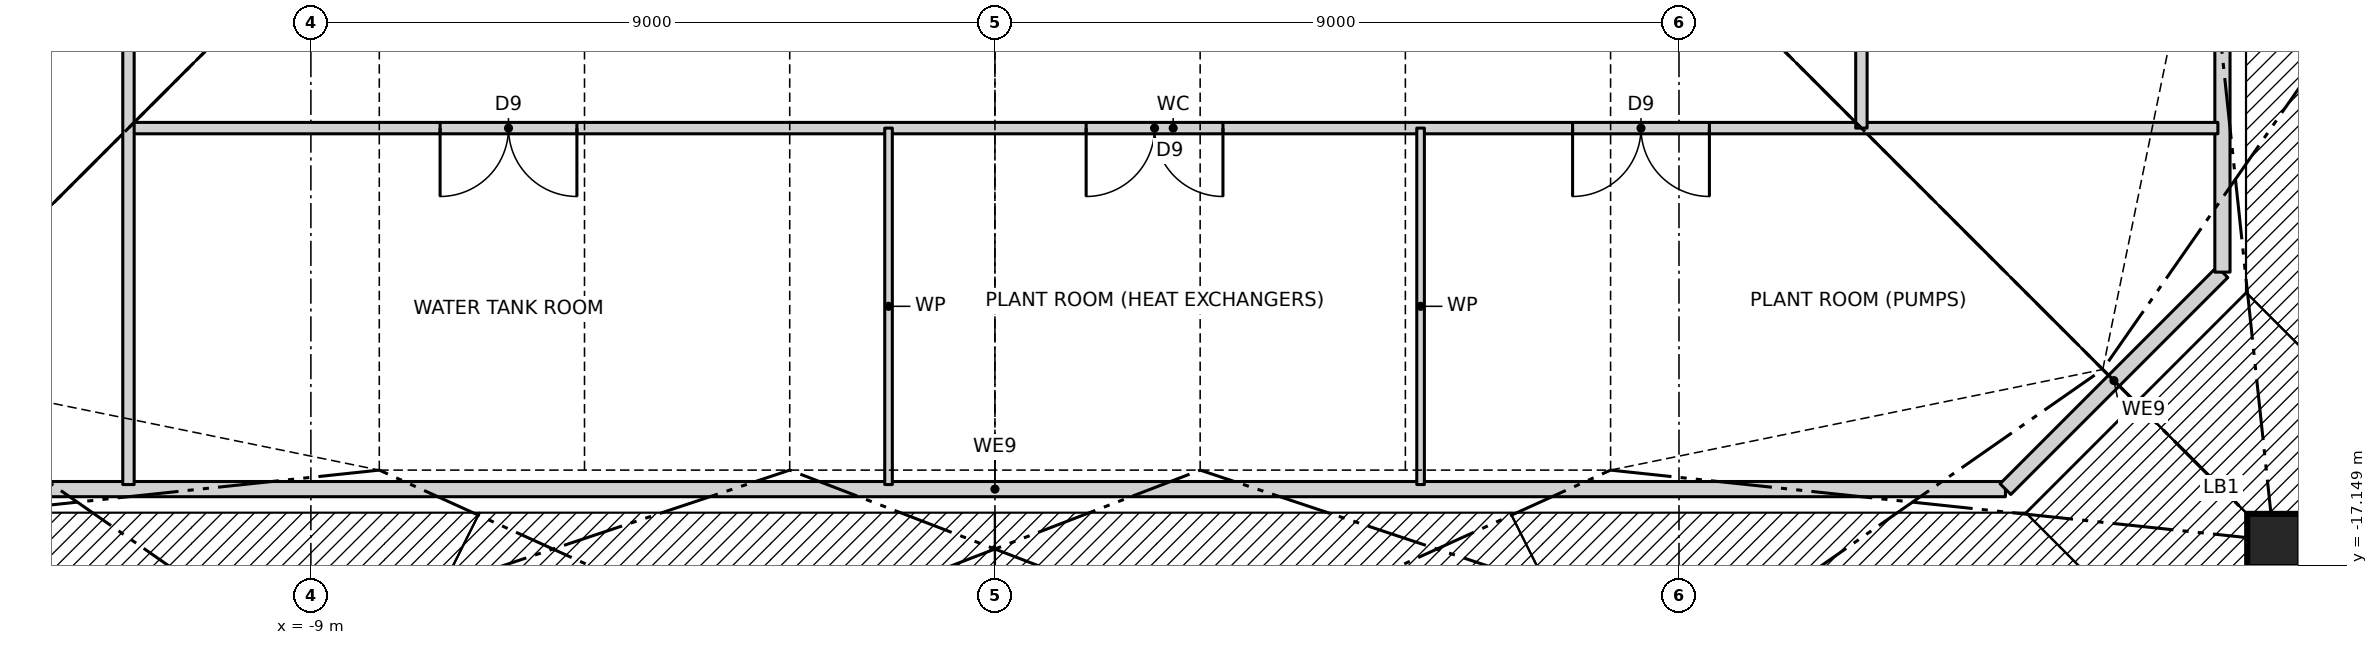
"""IFC4 building model, lengths in metres.
Left out: names, types, materials, properties, quantities, classifications, styles, units other than length and angle.
Written with IfcOpenShell. Run it as: python <this file> out.ifc"""

import sys

from ifc_helpers import new_model, si_unit, direction, frame, frame_2d, origin, origin_2d, place, context, subcontext, project, spatial, rectangle, hollow_rectangle, extrude, clip, halfspace, element, fill, save


model = new_model("IFC4")
c1 = context("Model", 3, precision=1e-05, world=origin(), true_north=direction((0.0, 1.0)))
c2 = subcontext(c1, "Body", "Model", "MODEL_VIEW")
j1 = project(units=[si_unit("LENGTHUNIT", "METRE"), si_unit("PLANEANGLEUNIT", "RADIAN")], contexts=[c1])
p1 = place(None, origin())
s1 = spatial("IfcSite", under=j1, at=p1, CompositionType="ELEMENT")
p2 = place(p1, origin())
s2 = spatial("IfcBuilding", under=s1, at=p2, CompositionType="ELEMENT")
p3 = place(p2, frame((0.0, 0.0, 209.0)))
s3 = spatial("IfcBuildingStorey", under=s2, at=p3, CompositionType="ELEMENT", Elevation=209.0)
p4 = place(p3, frame((-9.45, -18.15, 0.0), z_axis=(0.206127500627, 0.343583115532, 0.91622164142), x_axis=(-0.857517554715, 0.514454704863, 0.0)))
e1 = element("IfcColumn", 1, at=p4, inside=s3, PredefinedType="COLUMN", context=c2, shape_type="Clipping", body=[
    clip(clip(extrude(hollow_rectangle(XDim=0.7, YDim=0.7, WallThickness=0.06, at=origin_2d()), origin(), (0.0, 0.0, 1.0), 6.549), halfspace(frame((0.0, 0.0, 0.0), z_axis=(0.0, -0.400671815572, -0.91622164142), x_axis=(-0.857517554715, -0.471354534126, 0.206127500627)), False)), halfspace(frame((0.0, 2.404, 5.497), z_axis=(0.0, 0.400671815572, 0.91622164142), x_axis=(-0.857517554715, -0.471354534126, 0.206127500627)), False)),
])
p5 = place(p3, frame((-3.15, -18.15, 0.0), z_axis=(0.070044605522, 0.350261033367, 0.934029422311), x_axis=(-0.980584767795, 0.196095673508, 0.0)))
e2 = element("IfcColumn", 2, at=p5, inside=s3, PredefinedType="COLUMN", context=c2, shape_type="Clipping", body=[
    clip(clip(extrude(hollow_rectangle(XDim=0.7, YDim=0.7, WallThickness=0.06, at=origin_2d()), origin(), (0.0, 0.0, 1.0), 6.424), halfspace(frame((0.0, 0.0, 0.0), z_axis=(0.0, -0.357196078167, -0.934029422311), x_axis=(-0.980584767795, -0.183159128644, 0.070044605522)), False)), halfspace(frame((0.0, 2.143, 5.604), z_axis=(0.0, 0.357196078167, 0.934029422311), x_axis=(-0.980584767795, -0.183159128644, 0.070044605522)), False)),
])
p6 = place(p3, frame((3.15, -18.15, 0.0), z_axis=(-0.070044605522, 0.350261033367, 0.934029422311), x_axis=(-0.980584767795, -0.196095673508, 0.0)))
e3 = element("IfcColumn", 3, at=p6, inside=s3, PredefinedType="COLUMN", context=c2, shape_type="Clipping", body=[
    clip(clip(extrude(hollow_rectangle(XDim=0.7, YDim=0.7, WallThickness=0.06, at=origin_2d()), origin(), (0.0, 0.0, 1.0), 6.424), halfspace(frame((0.0, 0.0, 0.0), z_axis=(0.0, -0.357196078167, -0.934029422311), x_axis=(-0.980584767795, 0.183159128644, -0.070044605522)), False)), halfspace(frame((0.0, 2.143, 5.604), z_axis=(0.0, 0.357196078167, 0.934029422311), x_axis=(-0.980584767795, 0.183159128644, -0.070044605522)), False)),
])
p7 = place(p3, frame((9.45, -18.15, 0.0), z_axis=(-0.206127500627, 0.343583115532, 0.91622164142), x_axis=(-0.857517554715, -0.514454704863, 0.0)))
e4 = element("IfcColumn", 4, at=p7, inside=s3, PredefinedType="COLUMN", context=c2, shape_type="Clipping", body=[
    clip(clip(extrude(hollow_rectangle(XDim=0.7, YDim=0.7, WallThickness=0.06, at=origin_2d()), origin(), (0.0, 0.0, 1.0), 6.549), halfspace(frame((0.0, 0.0, 0.0), z_axis=(0.0, -0.400671815572, -0.91622164142), x_axis=(-0.857517554715, 0.471354534126, -0.206127500627)), False)), halfspace(frame((0.0, 2.404, 5.497), z_axis=(0.0, 0.400671815572, 0.91622164142), x_axis=(-0.857517554715, 0.471354534126, -0.206127500627)), False)),
])
p8 = place(p3, frame((16.826, -16.826, 0.0), z_axis=(-0.331294578225, 0.331294578225, 0.883452208599), x_axis=(-0.707106781187, -0.707106781187, 0.0)))
e5 = element("IfcColumn", 5, at=p8, inside=s3, PredefinedType="COLUMN", context=c2, shape_type="Clipping", body=[
    clip(clip(extrude(hollow_rectangle(XDim=0.7, YDim=0.7, WallThickness=0.22, at=origin_2d()), origin(), (0.0, 0.0, 1.0), 6.792), halfspace(frame((0.0, 0.0, 0.0), z_axis=(0.0, -0.468521285666, -0.883452208599), x_axis=(-0.707106781187, 0.624695047554, -0.331294578225)), False)), halfspace(frame((0.0, 2.811, 5.301), z_axis=(0.0, 0.468521285666, 0.883452208599), x_axis=(-0.707106781187, 0.624695047554, -0.331294578225)), False)),
])
p9 = place(p3, frame((-13.295, -16.15, 0.0), z_axis=(0.0, 0.0, 1.0), x_axis=(1.0, 0.0, 0.0)))
e6 = element("IfcWall", 6, at=p9, inside=s3, PredefinedType="PARTITIONING", context=c2, shape_type="SweptSolid", body=[
    extrude(rectangle(XDim=26.59, YDim=0.2, at=frame_2d((13.295, 0.0))), origin(), (0.0, 0.0, 1.0), 5.7),
])
p10 = place(p3, frame((13.295, -16.15, 0.0), z_axis=(0.0, 0.0, 1.0), x_axis=(0.707106781187, 0.707106781187, 0.0)))
e7 = element("IfcWall", 7, at=p10, inside=s3, PredefinedType="PARTITIONING", context=c2, shape_type="SweptSolid", body=[
    extrude(rectangle(XDim=4.038, YDim=0.2, at=frame_2d((2.019, 0.0))), origin(), (0.0, 0.0, 1.0), 5.7),
])
p11 = place(p3, frame((16.15, -13.295, 0.0), z_axis=(0.0, 0.0, 1.0), x_axis=(0.0, 1.0, 0.0)))
e8 = element("IfcWall", 8, at=p11, inside=s3, PredefinedType="PARTITIONING", context=c2, shape_type="SweptSolid", body=[
    extrude(rectangle(XDim=26.59, YDim=0.2, at=frame_2d((13.295, 0.0))), origin(), (0.0, 0.0, 1.0), 5.7),
])
p12 = place(p3, frame((-11.4, -11.4, 0.0), z_axis=(0.0, 0.0, 1.0), x_axis=(1.0, 0.0, 0.0)))
e9 = element("IfcWall", 9, at=p12, inside=s3, PredefinedType="PARTITIONING", context=c2, shape_type="SweptSolid", body=[
    extrude(rectangle(XDim=27.49, YDim=0.15, at=frame_2d((13.745, 0.0))), origin(), (0.0, 0.0, 1.0), 5.77),
])
p13 = place(p12, frame((4.1, 0.0, 0.0)))
e10 = element("IfcOpeningElement", 10, at=p13, cuts=e9, PredefinedType="OPENING", context=c2, shape_type="SweptSolid", body=[
    extrude(rectangle(XDim=1.8, YDim=2.1, at=frame_2d((0.9, 1.05))), frame((0.0, 0.085, 0.0), z_axis=(0.0, -1.0, 0.0), x_axis=(1.0, 0.0, 0.0)), (0.0, 0.0, 1.0), 0.17),
])
p14 = place(p12, frame((12.6, 0.0, 0.0)))
e11 = element("IfcOpeningElement", 11, at=p14, cuts=e9, PredefinedType="OPENING", context=c2, shape_type="SweptSolid", body=[
    extrude(rectangle(XDim=1.8, YDim=2.1, at=frame_2d((0.9, 1.05))), frame((0.0, 0.085, 0.0), z_axis=(0.0, -1.0, 0.0), x_axis=(1.0, 0.0, 0.0)), (0.0, 0.0, 1.0), 0.17),
])
p15 = place(p12, frame((19.0, 0.0, 0.0)))
e12 = element("IfcOpeningElement", 12, at=p15, cuts=e9, PredefinedType="OPENING", context=c2, shape_type="SweptSolid", body=[
    extrude(rectangle(XDim=1.8, YDim=2.1, at=frame_2d((0.9, 1.05))), frame((0.0, 0.085, 0.0), z_axis=(0.0, -1.0, 0.0), x_axis=(1.0, 0.0, 0.0)), (0.0, 0.0, 1.0), 0.17),
])
p16 = place(p3, frame((11.4, -11.4, 0.0), z_axis=(0.0, 0.0, 1.0), x_axis=(0.0, 1.0, 0.0)))
e13 = element("IfcWall", 13, at=p16, inside=s3, PredefinedType="PARTITIONING", context=c2, shape_type="SweptSolid", body=[
    extrude(rectangle(XDim=27.49, YDim=0.15, at=frame_2d((13.745, 0.0))), origin(), (0.0, 0.0, 1.0), 5.77),
])
p17 = place(p16, frame((10.5, 0.0, 0.0)))
e14 = element("IfcOpeningElement", 14, at=p17, cuts=e13, PredefinedType="OPENING", context=c2, shape_type="SweptSolid", body=[
    extrude(rectangle(XDim=1.8, YDim=2.1, at=frame_2d((0.9, 1.05))), frame((0.0, 0.085, 0.0), z_axis=(0.0, -1.0, 0.0), x_axis=(1.0, 0.0, 0.0)), (0.0, 0.0, 1.0), 0.17),
])
for number, where, z_axis, x_axis in (
    (15, (5.6, -16.09, 0.0), (0.0, 0.0, 1.0), (0.0, 1.0, 0.0)),
    (16, (-1.4, -16.09, 0.0), (0.0, 0.0, 1.0), (0.0, 1.0, 0.0)),
):
    element("IfcWall", number, at=place(p3, frame(where, z_axis=z_axis, x_axis=x_axis)), inside=s3, PredefinedType="PARTITIONING", context=c2, shape_type="SweptSolid", body=[
        extrude(rectangle(XDim=4.69, YDim=0.1, at=frame_2d((2.345, 0.0))), origin(), (0.0, 0.0, 1.0), 5.77),
    ])
p18 = place(p3, frame((-11.4, -16.09, 0.0), z_axis=(0.0, 0.0, 1.0), x_axis=(0.0, 1.0, 0.0)))
e17 = element("IfcWall", 17, at=p18, inside=s3, PredefinedType="PARTITIONING", context=c2, shape_type="SweptSolid", body=[
    extrude(rectangle(XDim=27.49, YDim=0.15, at=frame_2d((13.745, 0.0))), origin(), (0.0, 0.0, 1.0), 5.77),
])
p19 = place(p18, frame((15.19, 0.0, 0.0)))
e18 = element("IfcOpeningElement", 18, at=p19, cuts=e17, PredefinedType="OPENING", context=c2, shape_type="SweptSolid", body=[
    extrude(rectangle(XDim=1.8, YDim=2.1, at=frame_2d((0.9, 1.05))), frame((0.0, 0.085, 0.0), z_axis=(0.0, -1.0, 0.0), x_axis=(1.0, 0.0, 0.0)), (0.0, 0.0, 1.0), 0.17),
])
p20 = place(p13, frame((1.8, 0.0, 0.0), z_axis=(0.0, 0.0, 1.0), x_axis=(-1.0, 0.0, 0.0)))
e19 = element("IfcDoor", 19, at=p20, inside=s3, OperationType="DOUBLE_DOOR_SINGLE_SWING", PredefinedType="DOOR", context=c2, shape_type="SweptSolid", body=[
    extrude(rectangle(XDim=1.8, YDim=2.1, at=frame_2d((0.9, 1.05))), frame((0.0, 0.025, 0.0), z_axis=(0.0, -1.0, 0.0), x_axis=(1.0, 0.0, 0.0)), (0.0, 0.0, 1.0), 0.05),
])
fill(e10, e19)
p21 = place(p14, frame((1.8, 0.0, 0.0), z_axis=(0.0, 0.0, 1.0), x_axis=(-1.0, 0.0, 0.0)))
e20 = element("IfcDoor", 20, at=p21, inside=s3, OperationType="DOUBLE_DOOR_SINGLE_SWING", PredefinedType="DOOR", context=c2, shape_type="SweptSolid", body=[
    extrude(rectangle(XDim=1.8, YDim=2.1, at=frame_2d((0.9, 1.05))), frame((0.0, 0.025, 0.0), z_axis=(0.0, -1.0, 0.0), x_axis=(1.0, 0.0, 0.0)), (0.0, 0.0, 1.0), 0.05),
])
fill(e11, e20)
p22 = place(p15, frame((1.8, 0.0, 0.0), z_axis=(0.0, 0.0, 1.0), x_axis=(-1.0, 0.0, 0.0)))
e21 = element("IfcDoor", 21, at=p22, inside=s3, OperationType="DOUBLE_DOOR_SINGLE_SWING", PredefinedType="DOOR", context=c2, shape_type="SweptSolid", body=[
    extrude(rectangle(XDim=1.8, YDim=2.1, at=frame_2d((0.9, 1.05))), frame((0.0, 0.025, 0.0), z_axis=(0.0, -1.0, 0.0), x_axis=(1.0, 0.0, 0.0)), (0.0, 0.0, 1.0), 0.05),
])
fill(e12, e21)
save(model, sys.argv[1])
